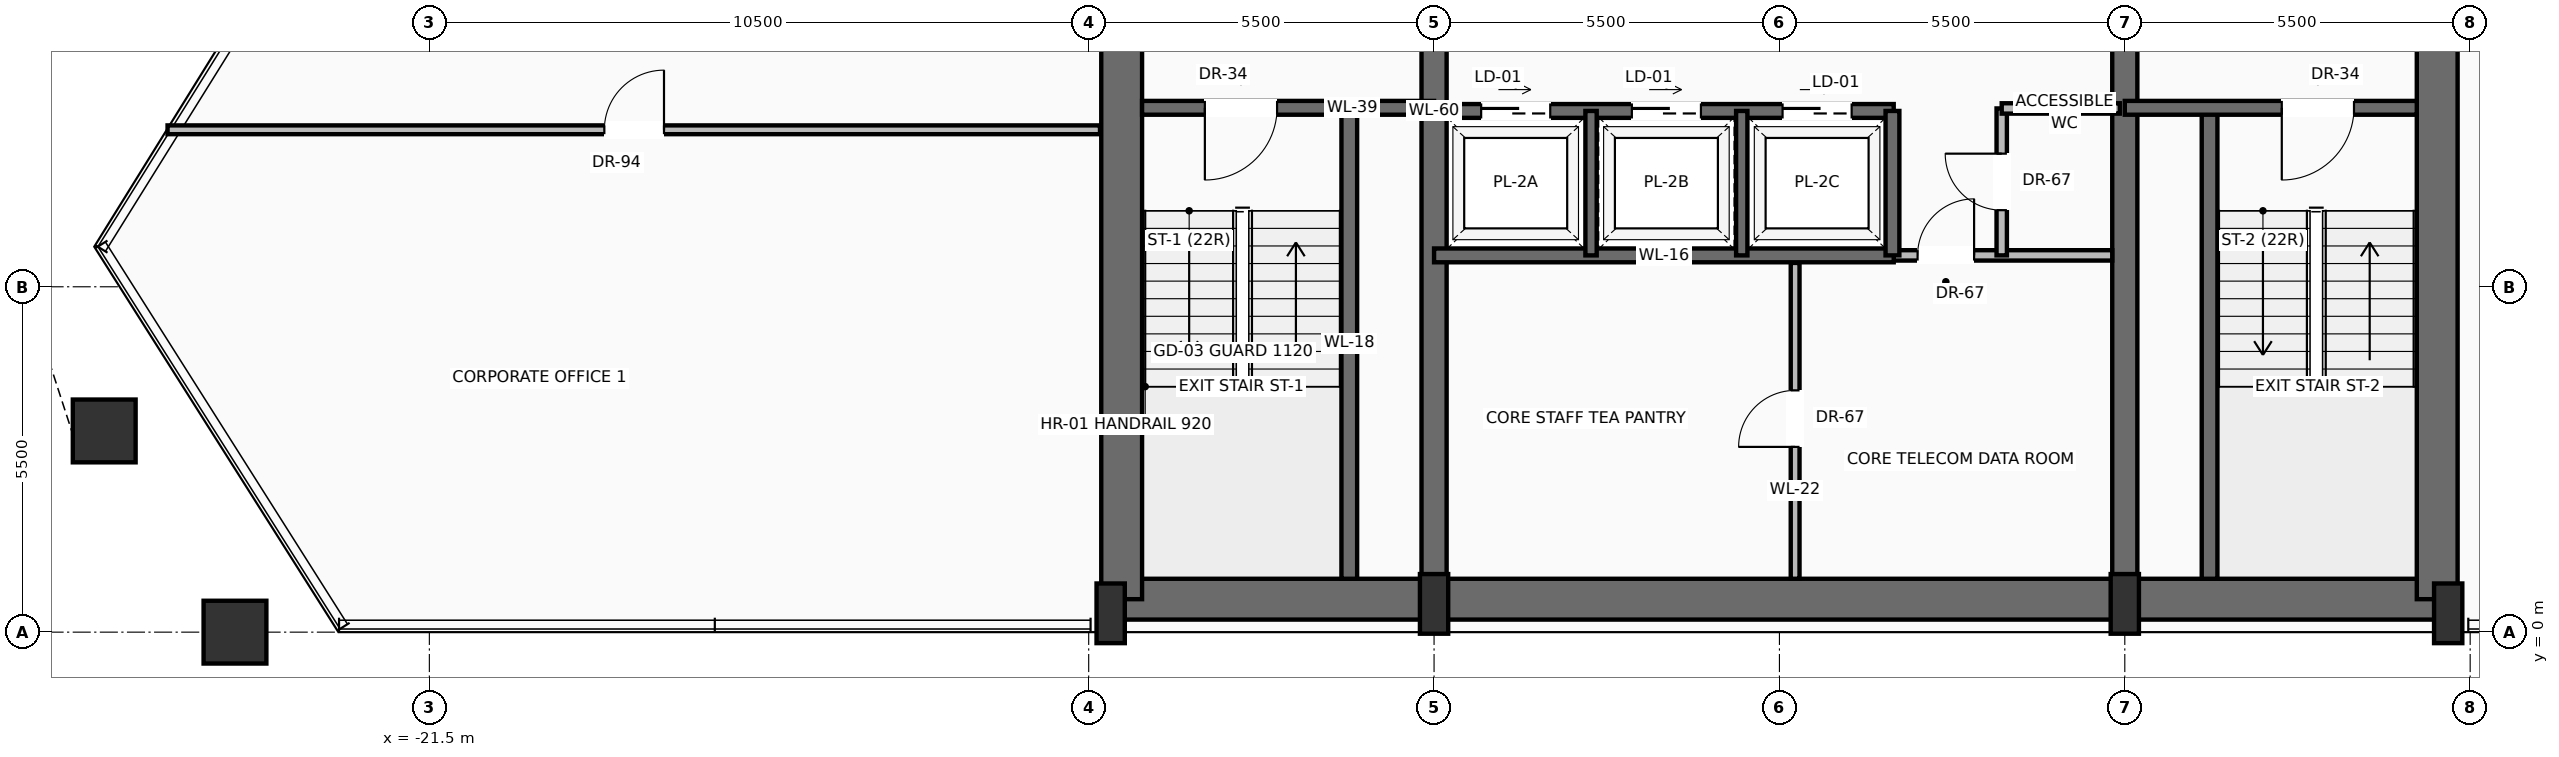
"""IFC4 building model, lengths in metres.
Left out: names, types, materials, properties, quantities, classifications, styles, units other than length and angle.
Written with IfcOpenShell. Run it as: python <this file> out.ifc"""

import sys

from ifc_helpers import new_model, si_unit, direction, frame, frame_2d, origin, origin_2d, place, context, subcontext, project, spatial, rectangle, hollow_rectangle, extrude, source, transform, mapped, element, fill, save


model = new_model("IFC4")
c1 = context("Model", 3, precision=1e-05, world=origin(), true_north=direction((0.0, 1.0)))
c2 = subcontext(c1, "Body", "Model", "MODEL_VIEW")
j1 = project(units=[si_unit("LENGTHUNIT", "METRE"), si_unit("PLANEANGLEUNIT", "RADIAN")], contexts=[c1])
p1 = place(None, origin())
s1 = spatial("IfcSite", under=j1, at=p1, CompositionType="ELEMENT")
p2 = place(p1, origin())
s2 = spatial("IfcBuilding", under=s1, at=p2, CompositionType="ELEMENT")
p3 = place(p2, frame((0.0, 0.0, 185.8)))
s3 = spatial("IfcBuildingStorey", under=s2, at=p3, CompositionType="ELEMENT", Elevation=185.8)
p4 = place(p3, frame((-10.65, 0.525, 0.0), z_axis=(0.0, 0.0, 1.0), x_axis=(1.0, 0.0, 0.0)))
e1 = element("IfcWall", 1, at=p4, inside=s3, PredefinedType="SHEAR", context=c2, shape_type="SweptSolid", body=[
    extrude(rectangle(XDim=21.3, YDim=0.65, at=frame_2d((10.65, 0.0))), origin(), (0.0, 0.0, 1.0), 3.47),
])
for number, where, z_axis, x_axis in (
    (2, (-10.475, 0.525, 0.0), (0.0, 0.0, 1.0), (0.0, 1.0, 0.0)),
    (3, (10.475, 0.525, 0.0), (0.0, 0.0, 1.0), (0.0, 1.0, 0.0)),
):
    element("IfcWall", number, at=place(p3, frame(where, z_axis=z_axis, x_axis=x_axis)), inside=s3, PredefinedType="SHEAR", context=c2, shape_type="SweptSolid", body=[
        extrude(rectangle(XDim=15.55, YDim=0.65, at=frame_2d((7.775, 0.0))), origin(), (0.0, 0.0, 1.0), 3.47),
    ])
p5 = place(p3, frame((-5.5, 0.525, 0.0), z_axis=(0.0, 0.0, 1.0), x_axis=(0.0, 1.0, 0.0)))
e4 = element("IfcWall", 4, at=p5, inside=s3, PredefinedType="SHEAR", context=c2, shape_type="SweptSolid", body=[
    extrude(rectangle(XDim=15.55, YDim=0.4, at=frame_2d((7.775, 0.0))), origin(), (0.0, 0.0, 1.0), 3.47),
])
p6 = place(p5, frame((8.975, 0.0, 0.0)))
e5 = element("IfcOpeningElement", 5, at=p6, cuts=e4, PredefinedType="OPENING", context=c2, shape_type="SweptSolid", body=[
    extrude(rectangle(XDim=1.1, YDim=2.2, at=frame_2d((0.55, 1.1))), frame((0.0, 0.21, 0.0), z_axis=(0.0, -1.0, 0.0), x_axis=(1.0, 0.0, 0.0)), (0.0, 0.0, 1.0), 0.42),
])
p7 = place(p3, frame((5.5, 0.525, 0.0), z_axis=(0.0, 0.0, 1.0), x_axis=(0.0, 1.0, 0.0)))
e6 = element("IfcWall", 6, at=p7, inside=s3, PredefinedType="SHEAR", context=c2, shape_type="SweptSolid", body=[
    extrude(rectangle(XDim=15.55, YDim=0.4, at=frame_2d((7.775, 0.0))), origin(), (0.0, 0.0, 1.0), 3.47),
])
p8 = place(p7, frame((8.975, 0.0, 0.0)))
e7 = element("IfcOpeningElement", 7, at=p8, cuts=e6, PredefinedType="OPENING", context=c2, shape_type="SweptSolid", body=[
    extrude(rectangle(XDim=1.1, YDim=2.2, at=frame_2d((0.55, 1.1))), frame((0.0, 0.21, 0.0), z_axis=(0.0, -1.0, 0.0), x_axis=(1.0, 0.0, 0.0)), (0.0, 0.0, 1.0), 0.42),
])
m1 = source(origin(), c2, "Body", "SweptSolid", [
    extrude(rectangle(XDim=0.45, YDim=0.95, at=origin_2d()), origin(), (0.0, 0.0, 1.0), 3.7),
])
for number, where, z_axis, x_axis in (
    (8, (-10.65, 0.3, 0.0), (0.0, 0.0, 1.0), (1.0, 0.0, 0.0)),
    (9, (-5.5, 0.45, 0.0), (0.0, 0.0, 1.0), (1.0, 0.0, 0.0)),
    (10, (5.5, 0.45, 0.0), (0.0, 0.0, 1.0), (1.0, 0.0, 0.0)),
    (11, (10.65, 0.3, 0.0), (0.0, 0.0, 1.0), (1.0, 0.0, 0.0)),
):
    element("IfcColumn", number, at=place(p3, frame(where, z_axis=z_axis, x_axis=x_axis)), inside=s3, PredefinedType="PILASTER", context=c2, shape_type="MappedRepresentation", body=[
        mapped(m1, transform((0.0, 0.0, 0.0), scale=1.0)),
    ])
m2 = source(origin(), c2, "Body", "SweptSolid", [
    extrude(hollow_rectangle(XDim=1.0, YDim=1.0, WallThickness=0.05, at=origin_2d()), origin(), (0.0, 0.0, 1.0), 3.691),
])
p9 = place(p3, frame((-24.595, 0.0, 0.004), z_axis=(-0.007209284172, 0.0, 0.999974012773), x_axis=(0.0, -1.0, 0.0)))
e12 = element("IfcColumn", 12, at=p9, inside=s3, PredefinedType="COLUMN", context=c2, shape_type="MappedRepresentation", body=[
    mapped(m2, transform((0.0, 0.0, 0.0), scale=1.0)),
])
m3 = source(origin(), c2, "Body", "SweptSolid", [
    extrude(hollow_rectangle(XDim=1.0, YDim=1.0, WallThickness=0.05, at=origin_2d()), origin(), (0.0, 0.0, 1.0), 3.692),
])
p10 = place(p3, frame((-26.678, 3.204, 0.004), z_axis=(0.003108287102, -0.015409167975, 0.999876440413), x_axis=(0.980255717066, 0.197733985846, 0.0)))
e13 = element("IfcColumn", 13, at=p10, inside=s3, PredefinedType="COLUMN", context=c2, shape_type="MappedRepresentation", body=[
    mapped(m3, transform((0.0, 0.0, 0.0), scale=1.0)),
])
p11 = place(p3, frame((-6.85, 0.85, 0.0), z_axis=(0.0, 0.0, 1.0), x_axis=(0.0, 1.0, 0.0)))
e14 = element("IfcWall", 14, at=p11, inside=s3, PredefinedType="SOLIDWALL", context=c2, shape_type="SweptSolid", body=[
    extrude(rectangle(XDim=7.5, YDim=0.25, at=frame_2d((3.75, 0.0))), origin(), (0.0, 0.0, 1.0), 3.47),
])
p12 = place(p3, frame((-5.5, 8.35, 0.0), z_axis=(0.0, 0.0, 1.0), x_axis=(-1.0, 0.0, 0.0)))
e15 = element("IfcWall", 15, at=p12, inside=s3, PredefinedType="SOLIDWALL", context=c2, shape_type="SweptSolid", body=[
    extrude(rectangle(XDim=4.65, YDim=0.22, at=frame_2d((2.325, 0.0))), origin(), (0.0, 0.0, 1.0), 3.47),
])
p13 = place(p12, frame((2.5, 0.0, 0.0)))
e16 = element("IfcOpeningElement", 16, at=p13, cuts=e15, PredefinedType="OPENING", context=c2, shape_type="SweptSolid", body=[
    extrude(rectangle(XDim=1.15, YDim=2.2, at=frame_2d((0.575, 1.1))), frame((0.0, 0.12, 0.0), z_axis=(0.0, -1.0, 0.0), x_axis=(1.0, 0.0, 0.0)), (0.0, 0.0, 1.0), 0.24),
])
p14 = place(p3, frame((6.85, 0.85, 0.0), z_axis=(0.0, 0.0, 1.0), x_axis=(0.0, 1.0, 0.0)))
e17 = element("IfcWall", 17, at=p14, inside=s3, PredefinedType="SOLIDWALL", context=c2, shape_type="SweptSolid", body=[
    extrude(rectangle(XDim=7.5, YDim=0.25, at=frame_2d((3.75, 0.0))), origin(), (0.0, 0.0, 1.0), 3.47),
])
p15 = place(p3, frame((10.15, 8.35, 0.0), z_axis=(0.0, 0.0, 1.0), x_axis=(-1.0, 0.0, 0.0)))
e18 = element("IfcWall", 18, at=p15, inside=s3, PredefinedType="SOLIDWALL", context=c2, shape_type="SweptSolid", body=[
    extrude(rectangle(XDim=4.65, YDim=0.22, at=frame_2d((2.325, 0.0))), origin(), (0.0, 0.0, 1.0), 3.47),
])
p16 = place(p15, frame((1.0, 0.0, 0.0)))
e19 = element("IfcOpeningElement", 19, at=p16, cuts=e18, PredefinedType="OPENING", context=c2, shape_type="SweptSolid", body=[
    extrude(rectangle(XDim=1.15, YDim=2.2, at=frame_2d((0.575, 1.1))), frame((0.0, 0.12, 0.0), z_axis=(0.0, -1.0, 0.0), x_axis=(1.0, 0.0, 0.0)), (0.0, 0.0, 1.0), 0.24),
])
p17 = place(p3, frame((1.82, 6.0, 0.0), z_axis=(0.0, 0.0, 1.0), x_axis=(1.0, 0.0, 0.0)))
e20 = element("IfcWall", 20, at=p17, inside=s3, PredefinedType="PARTITIONING", context=c2, shape_type="SweptSolid", body=[
    extrude(rectangle(XDim=3.48, YDim=0.165, at=frame_2d((1.74, 0.0))), origin(), (0.0, 0.0, 1.0), 3.462),
])
p18 = place(p17, frame((0.38, 0.0, 0.0)))
e21 = element("IfcOpeningElement", 21, at=p18, cuts=e20, PredefinedType="OPENING", context=c2, shape_type="SweptSolid", body=[
    extrude(rectangle(XDim=0.9, YDim=2.1, at=frame_2d((0.45, 1.05))), frame((0.0, 0.093, 0.0), z_axis=(0.0, -1.0, 0.0), x_axis=(1.0, 0.0, 0.0)), (0.0, 0.0, 1.0), 0.185),
])
p19 = place(p3, frame((0.25, 0.85, 0.0), z_axis=(0.0, 0.0, 1.0), x_axis=(0.0, 1.0, 0.0)))
e22 = element("IfcWall", 22, at=p19, inside=s3, PredefinedType="PARTITIONING", context=c2, shape_type="SweptSolid", body=[
    extrude(rectangle(XDim=5.03, YDim=0.14, at=frame_2d((2.515, 0.0))), origin(), (0.0, 0.0, 1.0), 3.462),
])
p20 = place(p19, frame((2.1, 0.0, 0.0)))
e23 = element("IfcOpeningElement", 23, at=p20, cuts=e22, PredefinedType="OPENING", context=c2, shape_type="SweptSolid", body=[
    extrude(rectangle(XDim=0.9, YDim=2.1, at=frame_2d((0.45, 1.05))), frame((0.0, 0.08, 0.0), z_axis=(0.0, -1.0, 0.0), x_axis=(1.0, 0.0, 0.0)), (0.0, 0.0, 1.0), 0.16),
])
p21 = place(p3, frame((3.54, 6.0, 0.0), z_axis=(0.0, 0.0, 1.0), x_axis=(0.0, 1.0, 0.0)))
e24 = element("IfcWall", 24, at=p21, inside=s3, PredefinedType="PARTITIONING", context=c2, shape_type="SweptSolid", body=[
    extrude(rectangle(XDim=2.34, YDim=0.165, at=frame_2d((1.17, 0.0))), origin(), (0.0, 0.0, 1.0), 3.462),
])
p22 = place(p21, frame((0.72, 0.0, 0.0)))
e25 = element("IfcOpeningElement", 25, at=p22, cuts=e24, PredefinedType="OPENING", context=c2, shape_type="SweptSolid", body=[
    extrude(rectangle(XDim=0.9, YDim=2.1, at=frame_2d((0.45, 1.05))), frame((0.0, 0.093, 0.0), z_axis=(0.0, -1.0, 0.0), x_axis=(1.0, 0.0, 0.0)), (0.0, 0.0, 1.0), 0.185),
])
p23 = place(p3, frame((3.54, 8.34, 0.0), z_axis=(0.0, 0.0, 1.0), x_axis=(1.0, 0.0, 0.0)))
e26 = element("IfcWall", 26, at=p23, inside=s3, PredefinedType="PARTITIONING", context=c2, shape_type="SweptSolid", body=[
    extrude(rectangle(XDim=1.88, YDim=0.165, at=frame_2d((0.94, 0.0))), origin(), (0.0, 0.0, 1.0), 3.462),
])
p24 = place(p3, frame((-5.5, 6.0, 0.0), z_axis=(0.0, 0.0, 1.0), x_axis=(1.0, 0.0, 0.0)))
e27 = element("IfcWall", 27, at=p24, inside=s3, PredefinedType="SOLIDWALL", context=c2, shape_type="SweptSolid", body=[
    extrude(rectangle(XDim=7.32, YDim=0.22, at=frame_2d((3.66, 0.0))), origin(), (0.0, 0.0, 1.0), 3.47),
])
p25 = place(p3, frame((-5.5, 8.3, 0.0), z_axis=(0.0, 0.0, 1.0), x_axis=(1.0, 0.0, 0.0)))
e28 = element("IfcWall", 28, at=p25, inside=s3, PredefinedType="SOLIDWALL", context=c2, shape_type="SweptSolid", body=[
    extrude(rectangle(XDim=7.32, YDim=0.22, at=frame_2d((3.66, 0.0))), origin(), (0.0, 0.0, 1.0), 3.47),
])
p26 = place(p25, frame((0.75, 0.0, 0.0)))
e29 = element("IfcOpeningElement", 29, at=p26, cuts=e28, PredefinedType="OPENING", context=c2, shape_type="SweptSolid", body=[
    extrude(rectangle(XDim=1.1, YDim=2.2, at=frame_2d((0.55, 1.1))), frame((0.0, 0.12, 0.0), z_axis=(0.0, -1.0, 0.0), x_axis=(1.0, 0.0, 0.0)), (0.0, 0.0, 1.0), 0.24),
])
p27 = place(p25, frame((3.15, 0.0, 0.0)))
e30 = element("IfcOpeningElement", 30, at=p27, cuts=e28, PredefinedType="OPENING", context=c2, shape_type="SweptSolid", body=[
    extrude(rectangle(XDim=1.1, YDim=2.2, at=frame_2d((0.55, 1.1))), frame((0.0, 0.12, 0.0), z_axis=(0.0, -1.0, 0.0), x_axis=(1.0, 0.0, 0.0)), (0.0, 0.0, 1.0), 0.24),
])
p28 = place(p25, frame((5.55, 0.0, 0.0)))
e31 = element("IfcOpeningElement", 31, at=p28, cuts=e28, PredefinedType="OPENING", context=c2, shape_type="SweptSolid", body=[
    extrude(rectangle(XDim=1.1, YDim=2.2, at=frame_2d((0.55, 1.1))), frame((0.0, 0.12, 0.0), z_axis=(0.0, -1.0, 0.0), x_axis=(1.0, 0.0, 0.0)), (0.0, 0.0, 1.0), 0.24),
])
p29 = place(p3, frame((1.8, 6.0, 0.0), z_axis=(0.0, 0.0, 1.0), x_axis=(0.0, 1.0, 0.0)))
e32 = element("IfcWall", 32, at=p29, inside=s3, PredefinedType="SOLIDWALL", context=c2, shape_type="SweptSolid", body=[
    extrude(rectangle(XDim=2.3, YDim=0.22, at=frame_2d((1.15, 0.0))), origin(), (0.0, 0.0, 1.0), 3.47),
])
for number, where, z_axis, x_axis in (
    (33, (-3.0, 6.0, 0.0), (0.0, 0.0, 1.0), (0.0, 1.0, 0.0)),
    (34, (-0.6, 6.0, 0.0), (0.0, 0.0, 1.0), (0.0, 1.0, 0.0)),
):
    element("IfcWall", number, at=place(p3, frame(where, z_axis=z_axis, x_axis=x_axis)), inside=s3, PredefinedType="SOLIDWALL", context=c2, shape_type="SweptSolid", body=[
        extrude(rectangle(XDim=2.3, YDim=0.18, at=frame_2d((1.15, 0.0))), origin(), (0.0, 0.0, 1.0), 3.47),
    ])
p30 = place(p3, frame((-25.669, 8.0, 0.0), z_axis=(0.0, 0.0, 1.0), x_axis=(1.0, 0.0, 0.0)))
e35 = element("IfcWall", 35, at=p30, inside=s3, PredefinedType="PARTITIONING", context=c2, shape_type="SweptSolid", body=[
    extrude(rectangle(XDim=14.849, YDim=0.14, at=frame_2d((7.425, 0.0))), origin(), (0.0, 0.0, 1.0), 3.462),
])
p31 = place(p30, frame((6.956, 0.0, 0.0)))
e36 = element("IfcOpeningElement", 36, at=p31, cuts=e35, PredefinedType="OPENING", context=c2, shape_type="SweptSolid", body=[
    extrude(rectangle(XDim=0.95, YDim=2.2, at=frame_2d((0.475, 1.1))), frame((0.0, 0.08, 0.0), z_axis=(0.0, -1.0, 0.0), x_axis=(1.0, 0.0, 0.0)), (0.0, 0.0, 1.0), 0.16),
])
m4 = source(origin(), c2, "Body", "SweptSolid", [
    extrude(rectangle(XDim=1.15, YDim=2.2, at=frame_2d((0.575, 1.1))), frame((0.0, 0.025, 0.0), z_axis=(0.0, -1.0, 0.0), x_axis=(1.0, 0.0, 0.0)), (0.0, 0.0, 1.0), 0.05),
])
p32 = place(p13, origin())
e37 = element("IfcDoor", 37, at=p32, inside=s3, OperationType="SINGLE_SWING_RIGHT", PredefinedType="DOOR", context=c2, shape_type="MappedRepresentation", body=[
    mapped(m4, transform((0.0, 0.0, 0.0), scale=1.0)),
])
fill(e16, e37)
p33 = place(p16, origin())
e38 = element("IfcDoor", 38, at=p33, inside=s3, OperationType="SINGLE_SWING_RIGHT", PredefinedType="DOOR", context=c2, shape_type="MappedRepresentation", body=[
    mapped(m4, transform((0.0, 0.0, 0.0), scale=1.0)),
])
fill(e19, e38)
m5 = source(origin(), c2, "Body", "SweptSolid", [
    extrude(rectangle(XDim=0.9, YDim=2.1, at=frame_2d((0.45, 1.05))), frame((0.0, 0.025, 0.0), z_axis=(0.0, -1.0, 0.0), x_axis=(1.0, 0.0, 0.0)), (0.0, 0.0, 1.0), 0.05),
])
p34 = place(p18, origin())
e39 = element("IfcDoor", 39, at=p34, inside=s3, OperationType="SINGLE_SWING_RIGHT", PredefinedType="DOOR", context=c2, shape_type="MappedRepresentation", body=[
    mapped(m5, transform((0.0, 0.0, 0.0), scale=1.0)),
])
fill(e21, e39)
p35 = place(p20, origin())
e40 = element("IfcDoor", 40, at=p35, inside=s3, OperationType="SINGLE_SWING_LEFT", PredefinedType="DOOR", context=c2, shape_type="MappedRepresentation", body=[
    mapped(m5, transform((0.0, 0.0, 0.0), scale=1.0)),
])
fill(e23, e40)
p36 = place(p22, origin())
e41 = element("IfcDoor", 41, at=p36, inside=s3, OperationType="SINGLE_SWING_RIGHT", PredefinedType="DOOR", context=c2, shape_type="MappedRepresentation", body=[
    mapped(m5, transform((0.0, 0.0, 0.0), scale=1.0)),
])
fill(e25, e41)
m6 = source(origin(), c2, "Body", "SweptSolid", [
    extrude(rectangle(XDim=1.1, YDim=2.2, at=frame_2d((0.55, 1.1))), frame((0.0, 0.025, 0.0), z_axis=(0.0, -1.0, 0.0), x_axis=(1.0, 0.0, 0.0)), (0.0, 0.0, 1.0), 0.05),
])
p37 = place(p26, origin())
e42 = element("IfcDoor", 42, at=p37, inside=s3, OperationType="SLIDING_TO_LEFT", PredefinedType="DOOR", context=c2, shape_type="MappedRepresentation", body=[
    mapped(m6, transform((0.0, 0.0, 0.0), scale=1.0)),
])
fill(e29, e42)
p38 = place(p27, origin())
e43 = element("IfcDoor", 43, at=p38, inside=s3, OperationType="SLIDING_TO_LEFT", PredefinedType="DOOR", context=c2, shape_type="MappedRepresentation", body=[
    mapped(m6, transform((0.0, 0.0, 0.0), scale=1.0)),
])
fill(e30, e43)
p39 = place(p28, origin())
e44 = element("IfcDoor", 44, at=p39, inside=s3, OperationType="SLIDING_TO_LEFT", PredefinedType="DOOR", context=c2, shape_type="MappedRepresentation", body=[
    mapped(m6, transform((0.0, 0.0, 0.0), scale=1.0)),
])
fill(e31, e44)
m7 = source(origin(), c2, "Body", "SweptSolid", [
    extrude(rectangle(XDim=0.95, YDim=2.2, at=frame_2d((0.475, 1.1))), frame((0.0, 0.025, 0.0), z_axis=(0.0, -1.0, 0.0), x_axis=(1.0, 0.0, 0.0)), (0.0, 0.0, 1.0), 0.05),
])
p40 = place(p31, origin())
e45 = element("IfcDoor", 45, at=p40, inside=s3, OperationType="SINGLE_SWING_RIGHT", PredefinedType="DOOR", context=c2, shape_type="MappedRepresentation", body=[
    mapped(m7, transform((0.0, 0.0, 0.0), scale=1.0)),
])
fill(e36, e45)
save(model, sys.argv[1])
